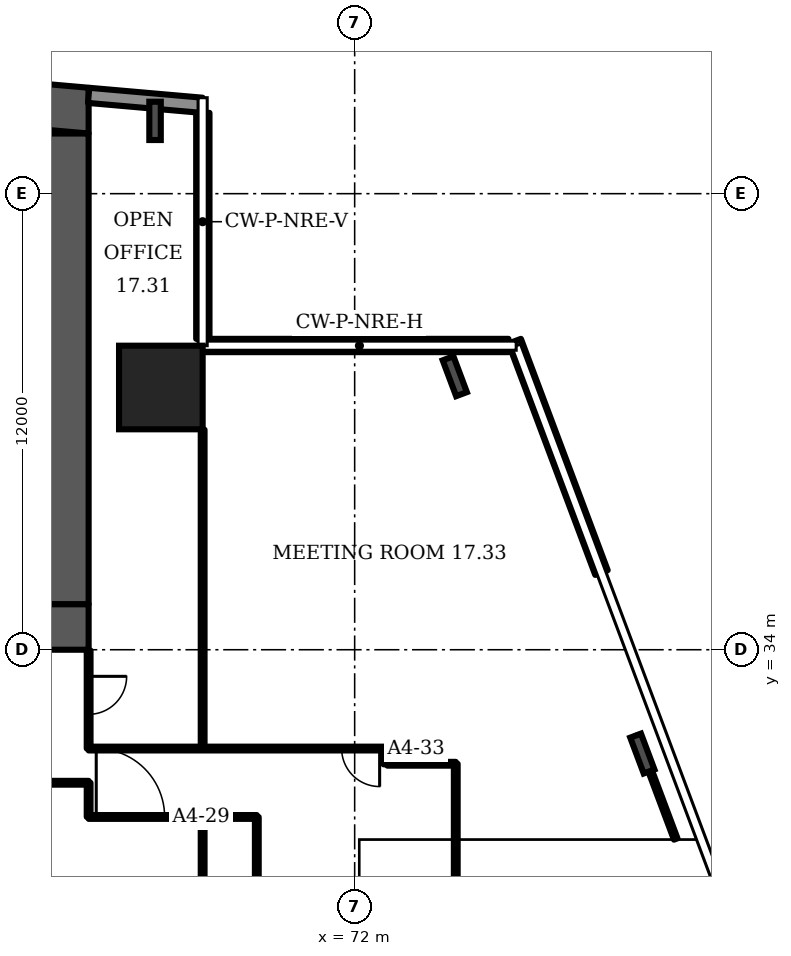
"""IFC4 building model, lengths in metres.
Left out: names, types, materials, properties, quantities, classifications, styles, units other than length and angle.
Written with IfcOpenShell. Run it as: python <this file> out.ifc"""

import sys

from ifc_helpers import new_model, si_unit, direction, frame, frame_2d, origin, origin_2d, place, context, subcontext, project, spatial, polyline, rectangle, i_section, outline, extrude, element, fill, save


model = new_model("IFC4")
c1 = context("Model", 3, precision=1e-05, world=origin(), true_north=direction((0.0, 1.0)))
c2 = subcontext(c1, "Body", "Model", "MODEL_VIEW")
j1 = project(units=[si_unit("LENGTHUNIT", "METRE"), si_unit("PLANEANGLEUNIT", "RADIAN")], contexts=[c1])
p1 = place(None, origin())
s1 = spatial("IfcSite", under=j1, at=p1, CompositionType="ELEMENT")
p2 = place(p1, origin())
s2 = spatial("IfcBuilding", under=s1, at=p2, CompositionType="ELEMENT")
p3 = place(p2, frame((0.0, 0.0, 81.1)))
s3 = spatial("IfcBuildingStorey", under=s2, at=p3, CompositionType="ELEMENT", Elevation=81.1)
p4 = place(p3, frame((0.0, 0.0, -0.0)))
e1 = element("IfcWall", 1, at=p4, inside=s3, PredefinedType="SHEAR", context=c2, shape_type="SweptSolid", body=[
    extrude(outline(polyline([(9.0, 47.583), (37.0, 50.032), (65.0, 47.583), (65.0, 48.787), (37.0, 51.237), (9.0, 48.787), (9.0, 47.583)])), origin(), (0.0, 0.0, 1.0), 3.6),
])
p5 = place(p3, frame((9.0, 34.6, 0.0), z_axis=(0.0, 0.0, 1.0), x_axis=(1.0, 0.0, 0.0)))
e2 = element("IfcWall", 2, at=p5, inside=s3, PredefinedType="SHEAR", context=c2, shape_type="SweptSolid", body=[
    extrude(rectangle(XDim=56.0, YDim=1.2, at=frame_2d((28.0, 0.0))), origin(), (0.0, 0.0, 1.0), 3.6),
])
p6 = place(p5, frame((2.0, 0.0, 0.0)))
e3 = element("IfcOpeningElement", 3, at=p6, cuts=e2, PredefinedType="OPENING", context=c2, shape_type="SweptSolid", body=[
    extrude(rectangle(XDim=1.0, YDim=2.1, at=frame_2d((0.5, 1.05))), frame((0.0, 0.61, 0.0), z_axis=(0.0, -1.0, 0.0), x_axis=(1.0, 0.0, 0.0)), (0.0, 0.0, 1.0), 1.22),
])
p7 = place(p5, frame((4.6, 0.0, 0.0)))
e4 = element("IfcOpeningElement", 4, at=p7, cuts=e2, PredefinedType="OPENING", context=c2, shape_type="SweptSolid", body=[
    extrude(rectangle(XDim=1.0, YDim=2.1, at=frame_2d((0.5, 1.05))), frame((0.0, 0.61, 0.0), z_axis=(0.0, -1.0, 0.0), x_axis=(1.0, 0.0, 0.0)), (0.0, 0.0, 1.0), 1.22),
])
p8 = place(p5, frame((7.867, 0.0, 0.0)))
e5 = element("IfcOpeningElement", 5, at=p8, cuts=e2, PredefinedType="OPENING", context=c2, shape_type="SweptSolid", body=[
    extrude(rectangle(XDim=1.1, YDim=2.1, at=frame_2d((0.55, 1.05))), frame((0.0, 0.61, 0.0), z_axis=(0.0, -1.0, 0.0), x_axis=(1.0, 0.0, 0.0)), (0.0, 0.0, 1.0), 1.22),
])
p9 = place(p5, frame((12.033, 0.0, 0.0)))
e6 = element("IfcOpeningElement", 6, at=p9, cuts=e2, PredefinedType="OPENING", context=c2, shape_type="SweptSolid", body=[
    extrude(rectangle(XDim=1.1, YDim=2.1, at=frame_2d((0.55, 1.05))), frame((0.0, 0.61, 0.0), z_axis=(0.0, -1.0, 0.0), x_axis=(1.0, 0.0, 0.0)), (0.0, 0.0, 1.0), 1.22),
])
p10 = place(p5, frame((9.8, 0.0, 0.0)))
e7 = element("IfcOpeningElement", 7, at=p10, cuts=e2, PredefinedType="OPENING", context=c2, shape_type="SweptSolid", body=[
    extrude(rectangle(XDim=1.4, YDim=2.1, at=frame_2d((0.7, 1.05))), frame((0.0, 0.61, 0.0), z_axis=(0.0, -1.0, 0.0), x_axis=(1.0, 0.0, 0.0)), (0.0, 0.0, 1.0), 1.22),
])
p11 = place(p5, frame((14.65, 0.0, 0.0)))
e8 = element("IfcOpeningElement", 8, at=p11, cuts=e2, PredefinedType="OPENING", context=c2, shape_type="SweptSolid", body=[
    extrude(rectangle(XDim=1.2, YDim=2.1, at=frame_2d((0.6, 1.05))), frame((0.0, 0.61, 0.0), z_axis=(0.0, -1.0, 0.0), x_axis=(1.0, 0.0, 0.0)), (0.0, 0.0, 1.0), 1.22),
])
p12 = place(p5, frame((21.867, 0.0, 0.0)))
e9 = element("IfcOpeningElement", 9, at=p12, cuts=e2, PredefinedType="OPENING", context=c2, shape_type="SweptSolid", body=[
    extrude(rectangle(XDim=1.1, YDim=2.1, at=frame_2d((0.55, 1.05))), frame((0.0, 0.61, 0.0), z_axis=(0.0, -1.0, 0.0), x_axis=(1.0, 0.0, 0.0)), (0.0, 0.0, 1.0), 1.22),
])
p13 = place(p5, frame((26.033, 0.0, 0.0)))
e10 = element("IfcOpeningElement", 10, at=p13, cuts=e2, PredefinedType="OPENING", context=c2, shape_type="SweptSolid", body=[
    extrude(rectangle(XDim=1.1, YDim=2.1, at=frame_2d((0.55, 1.05))), frame((0.0, 0.61, 0.0), z_axis=(0.0, -1.0, 0.0), x_axis=(1.0, 0.0, 0.0)), (0.0, 0.0, 1.0), 1.22),
])
p14 = place(p5, frame((23.8, 0.0, 0.0)))
e11 = element("IfcOpeningElement", 11, at=p14, cuts=e2, PredefinedType="OPENING", context=c2, shape_type="SweptSolid", body=[
    extrude(rectangle(XDim=1.4, YDim=2.1, at=frame_2d((0.7, 1.05))), frame((0.0, 0.61, 0.0), z_axis=(0.0, -1.0, 0.0), x_axis=(1.0, 0.0, 0.0)), (0.0, 0.0, 1.0), 1.22),
])
p15 = place(p5, frame((28.867, 0.0, 0.0)))
e12 = element("IfcOpeningElement", 12, at=p15, cuts=e2, PredefinedType="OPENING", context=c2, shape_type="SweptSolid", body=[
    extrude(rectangle(XDim=1.1, YDim=2.1, at=frame_2d((0.55, 1.05))), frame((0.0, 0.61, 0.0), z_axis=(0.0, -1.0, 0.0), x_axis=(1.0, 0.0, 0.0)), (0.0, 0.0, 1.0), 1.22),
])
p16 = place(p5, frame((33.033, 0.0, 0.0)))
e13 = element("IfcOpeningElement", 13, at=p16, cuts=e2, PredefinedType="OPENING", context=c2, shape_type="SweptSolid", body=[
    extrude(rectangle(XDim=1.1, YDim=2.1, at=frame_2d((0.55, 1.05))), frame((0.0, 0.61, 0.0), z_axis=(0.0, -1.0, 0.0), x_axis=(1.0, 0.0, 0.0)), (0.0, 0.0, 1.0), 1.22),
])
p17 = place(p5, frame((40.15, 0.0, 0.0)))
e14 = element("IfcOpeningElement", 14, at=p17, cuts=e2, PredefinedType="OPENING", context=c2, shape_type="SweptSolid", body=[
    extrude(rectangle(XDim=1.2, YDim=2.1, at=frame_2d((0.6, 1.05))), frame((0.0, 0.61, 0.0), z_axis=(0.0, -1.0, 0.0), x_axis=(1.0, 0.0, 0.0)), (0.0, 0.0, 1.0), 1.22),
])
p18 = place(p5, frame((44.8, 0.0, 0.0)))
e15 = element("IfcOpeningElement", 15, at=p18, cuts=e2, PredefinedType="OPENING", context=c2, shape_type="SweptSolid", body=[
    extrude(rectangle(XDim=1.4, YDim=2.1, at=frame_2d((0.7, 1.05))), frame((0.0, 0.61, 0.0), z_axis=(0.0, -1.0, 0.0), x_axis=(1.0, 0.0, 0.0)), (0.0, 0.0, 1.0), 1.22),
])
p19 = place(p5, frame((49.867, 0.0, 0.0)))
e16 = element("IfcOpeningElement", 16, at=p19, cuts=e2, PredefinedType="OPENING", context=c2, shape_type="SweptSolid", body=[
    extrude(rectangle(XDim=1.1, YDim=2.1, at=frame_2d((0.55, 1.05))), frame((0.0, 0.61, 0.0), z_axis=(0.0, -1.0, 0.0), x_axis=(1.0, 0.0, 0.0)), (0.0, 0.0, 1.0), 1.22),
])
p20 = place(p5, frame((53.5, 0.0, 0.0)))
e17 = element("IfcOpeningElement", 17, at=p20, cuts=e2, PredefinedType="OPENING", context=c2, shape_type="SweptSolid", body=[
    extrude(rectangle(XDim=1.1, YDim=2.1, at=frame_2d((0.55, 1.05))), frame((0.0, 0.61, 0.0), z_axis=(0.0, -1.0, 0.0), x_axis=(1.0, 0.0, 0.0)), (0.0, 0.0, 1.0), 1.22),
])
p21 = place(p5, frame((51.567, 0.0, 0.0)))
e18 = element("IfcOpeningElement", 18, at=p21, cuts=e2, PredefinedType="OPENING", context=c2, shape_type="SweptSolid", body=[
    extrude(rectangle(XDim=1.4, YDim=2.1, at=frame_2d((0.7, 1.05))), frame((0.0, 0.61, 0.0), z_axis=(0.0, -1.0, 0.0), x_axis=(1.0, 0.0, 0.0)), (0.0, 0.0, 1.0), 1.22),
])
p22 = place(p3, frame((64.4, 35.2, 0.0), z_axis=(0.0, 0.0, 1.0), x_axis=(0.0, 1.0, 0.0)))
e19 = element("IfcWall", 19, at=p22, inside=s3, PredefinedType="SHEAR", context=c2, shape_type="SweptSolid", body=[
    extrude(rectangle(XDim=12.383, YDim=1.2, at=frame_2d((6.191, 0.0))), origin(), (0.0, 0.0, 1.0), 3.6),
])
p23 = place(p3, frame((66.9, 40.9, 0.0), z_axis=(0.0, 0.0, 1.0), x_axis=(1.0, 0.0, 0.0)))
e20 = element("IfcColumn", 20, at=p23, inside=s3, PredefinedType="COLUMN", context=c2, shape_type="SweptSolid", body=[
    extrude(rectangle(XDim=2.2, YDim=2.2, at=origin_2d()), origin(), (0.0, 0.0, 1.0), 3.6),
])
for number, where, z_axis, x_axis in (
    (21, (79.57, 31.268, 0.0), (0.0, 0.0, 1.0), (0.936, 0.351, 0.0)),
    (22, (74.634, 41.196, 0.0), (0.0, 0.0, 1.0), (0.936, 0.351, 0.0)),
    (23, (66.748, 47.915, 0.0), (0.0, 0.0, 1.0), (1.0, 0.0, 0.0)),
):
    element("IfcColumn", number, at=place(p3, frame(where, z_axis=z_axis, x_axis=x_axis)), inside=s3, PredefinedType="COLUMN", context=c2, shape_type="SweptSolid", body=[
        extrude(i_section(OverallWidth=0.302, OverallDepth=1.008, WebThickness=0.021, FlangeThickness=0.04, FilletRadius=0.03, at=origin_2d()), origin(), (0.0, 0.0, 1.0), 3.6),
    ])
p24 = place(p3, frame((67.983, 48.326, 0.0), z_axis=(0.0, 0.0, 1.0), x_axis=(-0.996194, 0.087168, 0.0)))
e24 = element("IfcWall", 24, at=p24, inside=s3, PredefinedType="SOLIDWALL", context=c2, shape_type="SweptSolid", body=[
    extrude(rectangle(XDim=2.994, YDim=0.4, at=frame_2d((1.497, 0.0))), origin(), (0.0, 0.0, 1.0), 3.2),
])
p25 = place(p3, frame((78.494, 36.03, 0.0), z_axis=(0.0, 0.0, 1.0), x_axis=(-0.351108, 0.936338, 0.0)))
e25 = element("IfcWall", 25, at=p25, inside=s3, PredefinedType="SOLIDWALL", context=c2, shape_type="SweptSolid", body=[
    extrude(rectangle(XDim=6.503, YDim=0.35, at=frame_2d((3.251, 0.0))), origin(), (0.0, 0.0, 1.0), 1.0),
])
p26 = place(p3, frame((76.047, 42.005, 0.0), z_axis=(0.0, 0.0, 1.0), x_axis=(-1.0, 0.0, 0.0)))
e26 = element("IfcWall", 26, at=p26, inside=s3, PredefinedType="SOLIDWALL", context=c2, shape_type="SweptSolid", body=[
    extrude(rectangle(XDim=8.047, YDim=0.35, at=frame_2d((4.023, 0.0))), origin(), (0.0, 0.0, 1.0), 1.0),
])
p27 = place(p3, frame((68.005, 42.18, 0.0), z_axis=(0.0, 0.0, 1.0), x_axis=(0.0, 1.0, 0.0)))
e27 = element("IfcWall", 27, at=p27, inside=s3, PredefinedType="SOLIDWALL", context=c2, shape_type="SweptSolid", body=[
    extrude(rectangle(XDim=5.947, YDim=0.35, at=frame_2d((2.973, 0.0))), origin(), (0.0, 0.0, 1.0), 1.0),
])
p28 = place(p3, frame((45.3, 30.5, 0.0), z_axis=(0.0, 0.0, 1.0), x_axis=(1.0, 0.0, 0.0)))
e28 = element("IfcWall", 28, at=p28, inside=s3, PredefinedType="PARTITIONING", context=c2, shape_type="SweptSolid", body=[
    extrude(rectangle(XDim=19.7, YDim=0.1, at=frame_2d((9.85, 0.0))), origin(), (0.0, 0.0, 1.0), 3.2),
])
p29 = place(p3, frame((65.0, 29.6, 0.0), z_axis=(0.0, 0.0, 1.0), x_axis=(0.0, 1.0, 0.0)))
e29 = element("IfcWall", 29, at=p29, inside=s3, PredefinedType="PARTITIONING", context=c2, shape_type="SweptSolid", body=[
    extrude(rectangle(XDim=0.9, YDim=0.1, at=frame_2d((0.45, 0.0))), origin(), (0.0, 0.0, 1.0), 3.2),
])
p30 = place(p3, frame((65.0, 29.6, 0.0), z_axis=(0.0, 0.0, 1.0), x_axis=(1.0, 0.0, 0.0)))
e30 = element("IfcWall", 30, at=p30, inside=s3, PredefinedType="PARTITIONING", context=c2, shape_type="SweptSolid", body=[
    extrude(rectangle(XDim=4.425, YDim=0.1, at=frame_2d((2.212, 0.0))), origin(), (0.0, 0.0, 1.0), 3.2),
])
p31 = place(p30, frame((0.2, 0.0, 0.0)))
e31 = element("IfcOpeningElement", 31, at=p31, cuts=e30, PredefinedType="OPENING", context=c2, shape_type="SweptSolid", body=[
    extrude(rectangle(XDim=1.8, YDim=2.1, at=frame_2d((0.9, 1.05))), frame((0.0, 0.06, 0.0), z_axis=(0.0, -1.0, 0.0), x_axis=(1.0, 0.0, 0.0)), (0.0, 0.0, 1.0), 0.12),
])
p32 = place(p3, frame((65.0, 31.4, 0.0), z_axis=(0.0, 0.0, 1.0), x_axis=(0.0, 1.0, 0.0)))
e32 = element("IfcWall", 32, at=p32, inside=s3, PredefinedType="PARTITIONING", context=c2, shape_type="SweptSolid", body=[
    extrude(rectangle(XDim=2.58, YDim=0.1, at=frame_2d((1.29, 0.0))), origin(), (0.0, 0.0, 1.0), 3.2),
])
p33 = place(p32, frame((0.9, 0.0, 0.0)))
e33 = element("IfcOpeningElement", 33, at=p33, cuts=e32, PredefinedType="OPENING", context=c2, shape_type="SweptSolid", body=[
    extrude(rectangle(XDim=1.0, YDim=2.1, at=frame_2d((0.5, 1.05))), frame((0.0, 0.06, 0.0), z_axis=(0.0, -1.0, 0.0), x_axis=(1.0, 0.0, 0.0)), (0.0, 0.0, 1.0), 0.12),
])
p34 = place(p3, frame((65.0, 31.4, 0.0), z_axis=(0.0, 0.0, 1.0), x_axis=(1.0, 0.0, 0.0)))
e34 = element("IfcWall", 34, at=p34, inside=s3, PredefinedType="PARTITIONING", context=c2, shape_type="SweptSolid", body=[
    extrude(rectangle(XDim=7.81, YDim=0.1, at=frame_2d((3.905, 0.0))), origin(), (0.0, 0.0, 1.0), 3.2),
])
p35 = place(p34, frame((6.657, 0.0, 0.0)))
e35 = element("IfcOpeningElement", 35, at=p35, cuts=e34, PredefinedType="OPENING", context=c2, shape_type="SweptSolid", body=[
    extrude(rectangle(XDim=1.0, YDim=2.1, at=frame_2d((0.5, 1.05))), frame((0.0, 0.06, 0.0), z_axis=(0.0, -1.0, 0.0), x_axis=(1.0, 0.0, 0.0)), (0.0, 0.0, 1.0), 0.12),
])
p36 = place(p3, frame((68.0, 13.24, 0.0), z_axis=(0.0, 0.0, 1.0), x_axis=(0.0, 1.0, 0.0)))
e36 = element("IfcWall", 36, at=p36, inside=s3, PredefinedType="PARTITIONING", context=c2, shape_type="SweptSolid", body=[
    extrude(rectangle(XDim=16.36, YDim=0.1, at=frame_2d((8.18, 0.0))), origin(), (0.0, 0.0, 1.0), 3.2),
])
p37 = place(p3, frame((68.0, 31.4, 0.0), z_axis=(0.0, 0.0, 1.0), x_axis=(0.0, 1.0, 0.0)))
e37 = element("IfcWall", 37, at=p37, inside=s3, PredefinedType="PARTITIONING", context=c2, shape_type="SweptSolid", body=[
    extrude(rectangle(XDim=8.39, YDim=0.1, at=frame_2d((4.195, 0.0))), origin(), (0.0, 0.0, 1.0), 3.2),
])
p38 = place(p3, frame((69.425, 26.4, 0.0), z_axis=(0.0, 0.0, 1.0), x_axis=(0.0, 1.0, 0.0)))
e38 = element("IfcWall", 38, at=p38, inside=s3, PredefinedType="PARTITIONING", context=c2, shape_type="SweptSolid", body=[
    extrude(rectangle(XDim=3.2, YDim=0.1, at=frame_2d((1.6, 0.0))), origin(), (0.0, 0.0, 1.0), 3.2),
])
p39 = place(p3, frame((72.81, 30.985, 0.0), z_axis=(0.0, 0.0, 1.0), x_axis=(0.0, 1.0, 0.0)))
e39 = element("IfcWall", 39, at=p39, inside=s3, PredefinedType="PARTITIONING", context=c2, shape_type="SweptSolid", body=[
    extrude(rectangle(XDim=0.415, YDim=0.1, at=frame_2d((0.208, 0.0))), origin(), (0.0, 0.0, 1.0), 3.2),
])
p40 = place(p3, frame((72.86, 31.0, 0.0), z_axis=(0.0, 0.0, 1.0), x_axis=(1.0, 0.0, 0.0)))
e40 = element("IfcWall", 40, at=p40, inside=s3, PredefinedType="PARTITIONING", context=c2, shape_type="SweptSolid", body=[
    extrude(rectangle(XDim=1.8, YDim=0.1, at=frame_2d((0.9, 0.0))), origin(), (0.0, 0.0, 1.0), 3.2),
])
p41 = place(p3, frame((74.66, 27.675, 0.0), z_axis=(0.0, 0.0, 1.0), x_axis=(0.0, 1.0, 0.0)))
e41 = element("IfcWall", 41, at=p41, inside=s3, PredefinedType="PARTITIONING", context=c2, shape_type="SweptSolid", body=[
    extrude(rectangle(XDim=3.325, YDim=0.1, at=frame_2d((1.663, 0.0))), origin(), (0.0, 0.0, 1.0), 3.2),
])
p42 = place(p3, frame((80.448, 29.02, 0.0), z_axis=(0.0, 0.0, 1.0), x_axis=(-0.35129, 0.93627, 0.0)))
e42 = element("IfcWall", 42, at=p42, inside=s3, PredefinedType="PARTITIONING", context=c2, shape_type="SweptSolid", body=[
    extrude(rectangle(XDim=2.911, YDim=0.1, at=frame_2d((1.455, 0.0))), origin(), (0.0, 0.0, 1.0), 2.58),
])
p43 = place(p31, origin())
e43 = element("IfcDoor", 43, at=p43, inside=s3, OperationType="DOUBLE_DOOR_SINGLE_SWING", PredefinedType="DOOR", context=c2, shape_type="SweptSolid", body=[
    extrude(rectangle(XDim=1.8, YDim=2.1, at=frame_2d((0.9, 1.05))), frame((0.0, 0.025, 0.0), z_axis=(0.0, -1.0, 0.0), x_axis=(1.0, 0.0, 0.0)), (0.0, 0.0, 1.0), 0.05),
])
fill(e31, e43)
p44 = place(p35, origin())
e44 = element("IfcDoor", 44, at=p44, inside=s3, OperationType="SINGLE_SWING_RIGHT", PredefinedType="DOOR", context=c2, shape_type="SweptSolid", body=[
    extrude(rectangle(XDim=1.0, YDim=2.1, at=frame_2d((0.5, 1.05))), frame((0.0, 0.025, 0.0), z_axis=(0.0, -1.0, 0.0), x_axis=(1.0, 0.0, 0.0)), (0.0, 0.0, 1.0), 0.05),
])
fill(e35, e44)
p45 = place(p33, origin())
e45 = element("IfcDoor", 45, at=p45, inside=s3, OperationType="SINGLE_SWING_RIGHT", PredefinedType="DOOR", context=c2, shape_type="SweptSolid", body=[
    extrude(rectangle(XDim=1.0, YDim=2.1, at=frame_2d((0.5, 1.05))), frame((0.0, 0.025, 0.0), z_axis=(0.0, -1.0, 0.0), x_axis=(1.0, 0.0, 0.0)), (0.0, 0.0, 1.0), 0.05),
])
fill(e33, e45)
save(model, sys.argv[1])
